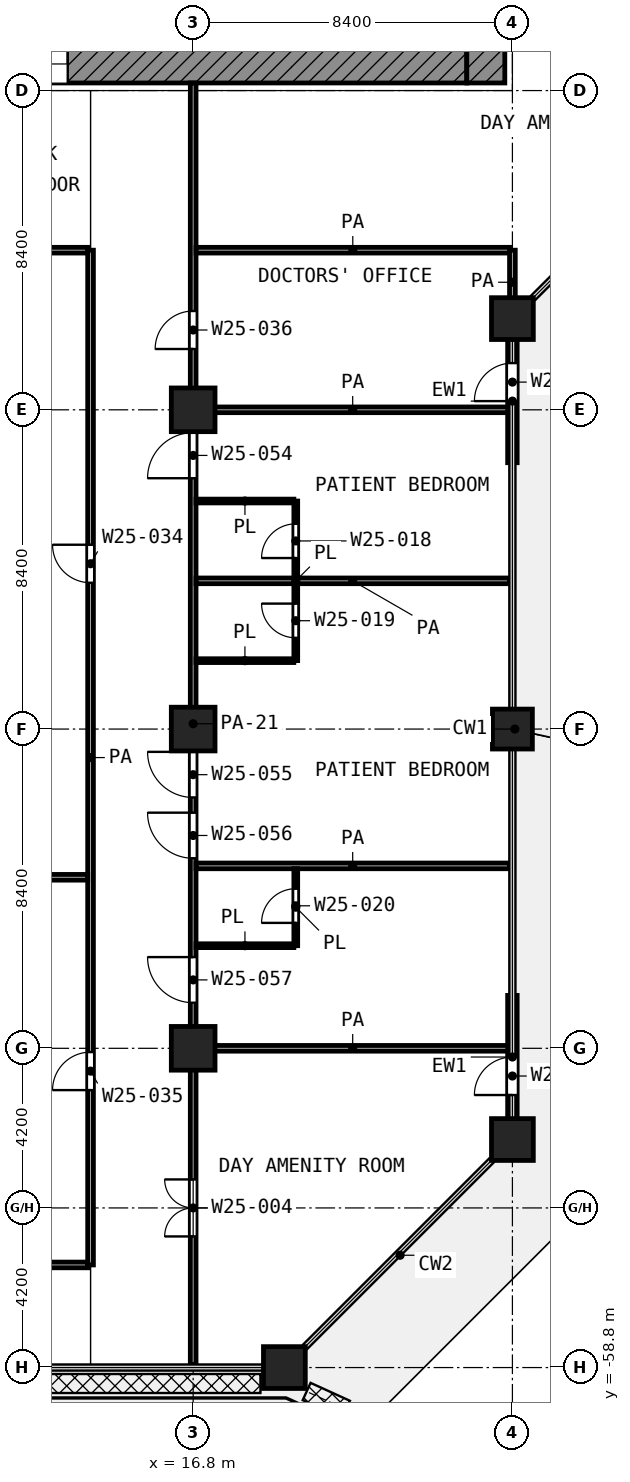
"""IFC4 building model, lengths in metres.
Left out: names, types, materials, properties, quantities, classifications, styles, units other than length and angle.
Written with IfcOpenShell. Run it as: python <this file> out.ifc"""

import sys

from ifc_helpers import new_model, si_unit, direction, frame, frame_2d, origin, origin_2d, place, context, subcontext, project, spatial, rectangle, extrude, element, fill, save


model = new_model("IFC4")
c1 = context("Model", 3, precision=1e-05, world=origin(), true_north=direction((0.0, 1.0)))
c2 = subcontext(c1, "Body", "Model", "MODEL_VIEW")
j1 = project(units=[si_unit("LENGTHUNIT", "METRE"), si_unit("PLANEANGLEUNIT", "RADIAN")], contexts=[c1])
p1 = place(None, origin())
s1 = spatial("IfcSite", under=j1, at=p1, CompositionType="ELEMENT")
p2 = place(p1, origin())
s2 = spatial("IfcBuilding", under=s1, at=p2, CompositionType="ELEMENT")
p3 = place(p2, frame((0.0, 0.0, 132.4)))
s3 = spatial("IfcBuildingStorey", under=s2, at=p3, CompositionType="ELEMENT", Elevation=132.4)
p4 = place(p3, frame((25.2, -31.2, 0.0), z_axis=(0.0, 0.0, 1.0), x_axis=(1.0, 0.0, 0.0)))
e1 = element("IfcColumn", 1, at=p4, inside=s3, PredefinedType="COLUMN", context=c2, shape_type="SweptSolid", body=[
    extrude(rectangle(XDim=1.1, YDim=1.1, at=origin_2d()), origin(), (0.0, 0.0, 1.0), 4.2),
])
for number, where, z_axis, x_axis in (
    (2, (16.8, -33.6, 0.0), (0.0, 0.0, 1.0), (1.0, 0.0, 0.0)),
    (3, (16.8, -42.0, 0.0), (0.0, 0.0, 1.0), (1.0, 0.0, 0.0)),
):
    element("IfcColumn", number, at=place(p3, frame(where, z_axis=z_axis, x_axis=x_axis)), inside=s3, PredefinedType="COLUMN", context=c2, shape_type="SweptSolid", body=[
        extrude(rectangle(XDim=1.15, YDim=1.15, at=origin_2d()), origin(), (0.0, 0.0, 1.0), 4.2),
    ])
p5 = place(p3, frame((25.2, -42.0, 0.0), z_axis=(0.0, 0.0, 1.0), x_axis=(1.0, 0.0, 0.0)))
e4 = element("IfcColumn", 4, at=p5, inside=s3, PredefinedType="COLUMN", context=c2, shape_type="SweptSolid", body=[
    extrude(rectangle(XDim=1.05, YDim=1.05, at=origin_2d()), origin(), (0.0, 0.0, 1.0), 4.2),
])
p6 = place(p3, frame((16.8, -50.4, 0.0), z_axis=(0.0, 0.0, 1.0), x_axis=(1.0, 0.0, 0.0)))
e5 = element("IfcColumn", 5, at=p6, inside=s3, PredefinedType="COLUMN", context=c2, shape_type="SweptSolid", body=[
    extrude(rectangle(XDim=1.15, YDim=1.15, at=origin_2d()), origin(), (0.0, 0.0, 1.0), 4.2),
])
for number, where, z_axis, x_axis in (
    (6, (25.2, -52.8, 0.0), (0.0, 0.0, 1.0), (1.0, 0.0, 0.0)),
    (7, (19.2, -58.8, 0.0), (0.0, 0.0, 1.0), (1.0, 0.0, 0.0)),
):
    element("IfcColumn", number, at=place(p3, frame(where, z_axis=z_axis, x_axis=x_axis)), inside=s3, PredefinedType="COLUMN", context=c2, shape_type="SweptSolid", body=[
        extrude(rectangle(XDim=1.1, YDim=1.1, at=origin_2d()), origin(), (0.0, 0.0, 1.0), 4.2),
    ])
p7 = place(p3, frame((25.2, -52.25, 0.0), z_axis=(0.0, 0.0, 1.0), x_axis=(0.0, 1.0, 0.0)))
e8 = element("IfcWall", 8, at=p7, inside=s3, PredefinedType="SOLIDWALL", context=c2, shape_type="SweptSolid", body=[
    extrude(rectangle(XDim=3.242, YDim=0.25, at=frame_2d((1.621, 0.0))), origin(), (0.0, 0.0, 1.0), 3.48),
])
p8 = place(p7, frame((0.621, 0.0, 0.0)))
e9 = element("IfcOpeningElement", 9, at=p8, cuts=e8, PredefinedType="OPENING", context=c2, shape_type="SweptSolid", body=[
    extrude(rectangle(XDim=1.0, YDim=2.1, at=frame_2d((0.5, 1.05))), frame((0.0, 0.135, 0.0), z_axis=(0.0, -1.0, 0.0), x_axis=(1.0, 0.0, 0.0)), (0.0, 0.0, 1.0), 0.27),
])
p9 = place(p3, frame((25.2, -34.992, 0.0), z_axis=(0.0, 0.0, 1.0), x_axis=(0.0, 1.0, 0.0)))
e10 = element("IfcWall", 10, at=p9, inside=s3, PredefinedType="SOLIDWALL", context=c2, shape_type="SweptSolid", body=[
    extrude(rectangle(XDim=3.242, YDim=0.25, at=frame_2d((1.621, 0.0))), origin(), (0.0, 0.0, 1.0), 3.48),
])
p10 = place(p9, frame((1.621, 0.0, 0.0)))
e11 = element("IfcOpeningElement", 11, at=p10, cuts=e10, PredefinedType="OPENING", context=c2, shape_type="SweptSolid", body=[
    extrude(rectangle(XDim=1.0, YDim=2.1, at=frame_2d((0.5, 1.05))), frame((0.0, 0.135, 0.0), z_axis=(0.0, -1.0, 0.0), x_axis=(1.0, 0.0, 0.0)), (0.0, 0.0, 1.0), 0.27),
])
p11 = place(p3, frame((5.4, -24.5, 0.0), z_axis=(0.0, 0.0, 1.0), x_axis=(1.0, 0.0, 0.0)))
e12 = element("IfcWall", 12, at=p11, inside=s3, PredefinedType="SHEAR", context=c2, shape_type="SweptSolid", body=[
    extrude(rectangle(XDim=18.6, YDim=1.0, at=frame_2d((9.3, 0.0))), origin(), (0.0, 0.0, 1.0), 3.6),
])
p12 = place(p11, frame((6.3, 0.0, 0.0)))
e13 = element("IfcOpeningElement", 13, at=p12, cuts=e12, PredefinedType="OPENING", context=c2, shape_type="SweptSolid", body=[
    extrude(rectangle(XDim=1.8, YDim=2.1, at=frame_2d((0.9, 1.05))), frame((0.0, 0.51, 0.0), z_axis=(0.0, -1.0, 0.0), x_axis=(1.0, 0.0, 0.0)), (0.0, 0.0, 1.0), 1.02),
])
p13 = place(p3, frame((24.5, -25.0, 0.0), z_axis=(0.0, 0.0, 1.0), x_axis=(0.0, 1.0, 0.0)))
e14 = element("IfcWall", 14, at=p13, inside=s3, PredefinedType="SHEAR", context=c2, shape_type="SweptSolid", body=[
    extrude(rectangle(XDim=1.0, YDim=1.0, at=frame_2d((0.5, 0.0))), origin(), (0.0, 0.0, 1.0), 3.6),
])
p14 = place(p3, frame((16.875, -47.7, 0.0), z_axis=(0.0, 0.0, 1.0), x_axis=(1.0, 0.0, 0.0)))
e15 = element("IfcWall", 15, at=p14, inside=s3, PredefinedType="PARTITIONING", context=c2, shape_type="SweptSolid", body=[
    extrude(rectangle(XDim=2.575, YDim=0.1, at=frame_2d((1.288, 0.0))), origin(), (0.0, 0.0, 1.0), 3.6),
])
p15 = place(p3, frame((16.875, -40.2, 0.0), z_axis=(0.0, 0.0, 1.0), x_axis=(1.0, 0.0, 0.0)))
e16 = element("IfcWall", 16, at=p15, inside=s3, PredefinedType="PARTITIONING", context=c2, shape_type="SweptSolid", body=[
    extrude(rectangle(XDim=2.574, YDim=0.1, at=frame_2d((1.287, 0.0))), origin(), (0.0, 0.0, 1.0), 3.6),
])
p16 = place(p3, frame((16.875, -36.0, 0.0), z_axis=(0.0, 0.0, 1.0), x_axis=(1.0, 0.0, 0.0)))
e17 = element("IfcWall", 17, at=p16, inside=s3, PredefinedType="PARTITIONING", context=c2, shape_type="SweptSolid", body=[
    extrude(rectangle(XDim=2.575, YDim=0.1, at=frame_2d((1.288, 0.0))), origin(), (0.0, 0.0, 1.0), 3.6),
])
p17 = place(p3, frame((19.5, -47.7, 0.0), z_axis=(0.0, 0.0, 1.0), x_axis=(0.0, 1.0, 0.0)))
e18 = element("IfcWall", 18, at=p17, inside=s3, PredefinedType="PARTITIONING", context=c2, shape_type="SweptSolid", body=[
    extrude(rectangle(XDim=2.025, YDim=0.1, at=frame_2d((1.012, 0.0))), origin(), (0.0, 0.0, 1.0), 3.6),
])
p18 = place(p17, frame((0.6, 0.0, 0.0)))
e19 = element("IfcOpeningElement", 19, at=p18, cuts=e18, PredefinedType="OPENING", context=c2, shape_type="SweptSolid", body=[
    extrude(rectangle(XDim=0.9, YDim=2.1, at=frame_2d((0.45, 1.05))), frame((0.0, 0.06, 0.0), z_axis=(0.0, -1.0, 0.0), x_axis=(1.0, 0.0, 0.0)), (0.0, 0.0, 1.0), 0.12),
])
p19 = place(p3, frame((19.5, -40.198, 0.0), z_axis=(0.0, 0.0, 1.0), x_axis=(0.0, 1.0, 0.0)))
e20 = element("IfcWall", 20, at=p19, inside=s3, PredefinedType="PARTITIONING", context=c2, shape_type="SweptSolid", body=[
    extrude(rectangle(XDim=4.198, YDim=0.1, at=frame_2d((2.099, 0.0))), origin(), (0.0, 0.0, 1.0), 3.6),
])
p20 = place(p19, frame((2.698, 0.0, 0.0)))
e21 = element("IfcOpeningElement", 21, at=p20, cuts=e20, PredefinedType="OPENING", context=c2, shape_type="SweptSolid", body=[
    extrude(rectangle(XDim=0.9, YDim=2.1, at=frame_2d((0.45, 1.05))), frame((0.0, 0.06, 0.0), z_axis=(0.0, -1.0, 0.0), x_axis=(1.0, 0.0, 0.0)), (0.0, 0.0, 1.0), 0.12),
])
p21 = place(p19, frame((0.599, 0.0, 0.0)))
e22 = element("IfcOpeningElement", 22, at=p21, cuts=e20, PredefinedType="OPENING", context=c2, shape_type="SweptSolid", body=[
    extrude(rectangle(XDim=0.9, YDim=2.1, at=frame_2d((0.45, 1.05))), frame((0.0, 0.06, 0.0), z_axis=(0.0, -1.0, 0.0), x_axis=(1.0, 0.0, 0.0)), (0.0, 0.0, 1.0), 0.12),
])
p22 = place(p3, frame((11.175, -56.1, 0.0), z_axis=(0.0, 0.0, 1.0), x_axis=(1.0, 0.0, 0.0)))
e23 = element("IfcWall", 23, at=p22, inside=s3, PredefinedType="PARTITIONING", context=c2, shape_type="SweptSolid", body=[
    extrude(rectangle(XDim=2.85, YDim=0.15, at=frame_2d((1.425, 0.0))), origin(), (0.0, 0.0, 1.0), 3.6),
])
p23 = place(p3, frame((16.875, -50.4, 0.0), z_axis=(0.0, 0.0, 1.0), x_axis=(1.0, 0.0, 0.0)))
e24 = element("IfcWall", 24, at=p23, inside=s3, PredefinedType="PARTITIONING", context=c2, shape_type="SweptSolid", body=[
    extrude(rectangle(XDim=8.245, YDim=0.15, at=frame_2d((4.123, 0.0))), origin(), (0.0, 0.0, 1.0), 3.6),
])
p24 = place(p3, frame((11.175, -45.9, 0.0), z_axis=(0.0, 0.0, 1.0), x_axis=(1.0, 0.0, 0.0)))
e25 = element("IfcWall", 25, at=p24, inside=s3, PredefinedType="PARTITIONING", context=c2, shape_type="SweptSolid", body=[
    extrude(rectangle(XDim=2.85, YDim=0.15, at=frame_2d((1.425, 0.0))), origin(), (0.0, 0.0, 1.0), 3.6),
])
for number, where, z_axis, x_axis in (
    (26, (16.875, -45.6, 0.0), (0.0, 0.0, 1.0), (1.0, 0.0, 0.0)),
    (27, (16.875, -38.1, 0.0), (0.0, 0.0, 1.0), (1.0, 0.0, 0.0)),
    (28, (16.875, -33.6, 0.0), (0.0, 0.0, 1.0), (1.0, 0.0, 0.0)),
):
    element("IfcWall", number, at=place(p3, frame(where, z_axis=z_axis, x_axis=x_axis)), inside=s3, PredefinedType="PARTITIONING", context=c2, shape_type="SweptSolid", body=[
        extrude(rectangle(XDim=8.245, YDim=0.15, at=frame_2d((4.123, 0.0))), origin(), (0.0, 0.0, 1.0), 3.6),
    ])
p25 = place(p3, frame((11.175, -29.4, 0.0), z_axis=(0.0, 0.0, 1.0), x_axis=(1.0, 0.0, 0.0)))
e29 = element("IfcWall", 29, at=p25, inside=s3, PredefinedType="PARTITIONING", context=c2, shape_type="SweptSolid", body=[
    extrude(rectangle(XDim=2.85, YDim=0.15, at=frame_2d((1.425, 0.0))), origin(), (0.0, 0.0, 1.0), 3.6),
])
p26 = place(p3, frame((16.875, -29.4, 0.0), z_axis=(0.0, 0.0, 1.0), x_axis=(1.0, 0.0, 0.0)))
e30 = element("IfcWall", 30, at=p26, inside=s3, PredefinedType="PARTITIONING", context=c2, shape_type="SweptSolid", body=[
    extrude(rectangle(XDim=8.25, YDim=0.15, at=frame_2d((4.125, 0.0))), origin(), (0.0, 0.0, 1.0), 3.6),
])
p27 = place(p3, frame((14.1, -56.1, 0.0), z_axis=(0.0, 0.0, 1.0), x_axis=(0.0, 1.0, 0.0)))
e31 = element("IfcWall", 31, at=p27, inside=s3, PredefinedType="PARTITIONING", context=c2, shape_type="SweptSolid", body=[
    extrude(rectangle(XDim=26.7, YDim=0.15, at=frame_2d((13.35, 0.0))), origin(), (0.0, 0.0, 1.0), 3.6),
])
p28 = place(p27, frame((17.95, 0.0, 0.0)))
e32 = element("IfcOpeningElement", 32, at=p28, cuts=e31, PredefinedType="OPENING", context=c2, shape_type="SweptSolid", body=[
    extrude(rectangle(XDim=1.0, YDim=2.1, at=frame_2d((0.5, 1.05))), frame((0.0, 0.085, 0.0), z_axis=(0.0, -1.0, 0.0), x_axis=(1.0, 0.0, 0.0)), (0.0, 0.0, 1.0), 0.17),
])
p29 = place(p27, frame((4.6, 0.0, 0.0)))
e33 = element("IfcOpeningElement", 33, at=p29, cuts=e31, PredefinedType="OPENING", context=c2, shape_type="SweptSolid", body=[
    extrude(rectangle(XDim=1.0, YDim=2.1, at=frame_2d((0.5, 1.05))), frame((0.0, 0.085, 0.0), z_axis=(0.0, -1.0, 0.0), x_axis=(1.0, 0.0, 0.0)), (0.0, 0.0, 1.0), 0.17),
])
p30 = place(p3, frame((16.8, -58.72, 0.0), z_axis=(0.0, 0.0, 1.0), x_axis=(0.0, 1.0, 0.0)))
e34 = element("IfcWall", 34, at=p30, inside=s3, PredefinedType="PARTITIONING", context=c2, shape_type="SweptSolid", body=[
    extrude(rectangle(XDim=33.72, YDim=0.15, at=frame_2d((16.86, 0.0))), origin(), (0.0, 0.0, 1.0), 2.7),
])
p31 = place(p30, frame((26.72, 0.0, 0.0)))
e35 = element("IfcOpeningElement", 35, at=p31, cuts=e34, PredefinedType="OPENING", context=c2, shape_type="SweptSolid", body=[
    extrude(rectangle(XDim=1.0, YDim=2.1, at=frame_2d((0.5, 1.05))), frame((0.0, 0.085, 0.0), z_axis=(0.0, -1.0, 0.0), x_axis=(1.0, 0.0, 0.0)), (0.0, 0.0, 1.0), 0.17),
])
p32 = place(p30, frame((23.32, 0.0, 0.0)))
e36 = element("IfcOpeningElement", 36, at=p32, cuts=e34, PredefinedType="OPENING", context=c2, shape_type="SweptSolid", body=[
    extrude(rectangle(XDim=1.2, YDim=2.1, at=frame_2d((0.6, 1.05))), frame((0.0, 0.085, 0.0), z_axis=(0.0, -1.0, 0.0), x_axis=(1.0, 0.0, 0.0)), (0.0, 0.0, 1.0), 0.17),
])
p33 = place(p30, frame((14.92, 0.0, 0.0)))
e37 = element("IfcOpeningElement", 37, at=p33, cuts=e34, PredefinedType="OPENING", context=c2, shape_type="SweptSolid", body=[
    extrude(rectangle(XDim=1.2, YDim=2.1, at=frame_2d((0.6, 1.05))), frame((0.0, 0.085, 0.0), z_axis=(0.0, -1.0, 0.0), x_axis=(1.0, 0.0, 0.0)), (0.0, 0.0, 1.0), 0.17),
])
p34 = place(p30, frame((13.32, 0.0, 0.0)))
e38 = element("IfcOpeningElement", 38, at=p34, cuts=e34, PredefinedType="OPENING", context=c2, shape_type="SweptSolid", body=[
    extrude(rectangle(XDim=1.2, YDim=2.1, at=frame_2d((0.6, 1.05))), frame((0.0, 0.085, 0.0), z_axis=(0.0, -1.0, 0.0), x_axis=(1.0, 0.0, 0.0)), (0.0, 0.0, 1.0), 0.17),
])
p35 = place(p30, frame((9.52, 0.0, 0.0)))
e39 = element("IfcOpeningElement", 39, at=p35, cuts=e34, PredefinedType="OPENING", context=c2, shape_type="SweptSolid", body=[
    extrude(rectangle(XDim=1.2, YDim=2.1, at=frame_2d((0.6, 1.05))), frame((0.0, 0.085, 0.0), z_axis=(0.0, -1.0, 0.0), x_axis=(1.0, 0.0, 0.0)), (0.0, 0.0, 1.0), 0.17),
])
p36 = place(p30, frame((3.37, 0.0, 0.0)))
e40 = element("IfcOpeningElement", 40, at=p36, cuts=e34, PredefinedType="OPENING", context=c2, shape_type="SweptSolid", body=[
    extrude(rectangle(XDim=1.5, YDim=2.1, at=frame_2d((0.75, 1.05))), frame((0.0, 0.085, 0.0), z_axis=(0.0, -1.0, 0.0), x_axis=(1.0, 0.0, 0.0)), (0.0, 0.0, 1.0), 0.17),
])
p37 = place(p3, frame((25.2, -31.087, 0.0), z_axis=(0.0, 0.0, 1.0), x_axis=(0.0, 1.0, 0.0)))
e41 = element("IfcWall", 41, at=p37, inside=s3, PredefinedType="PARTITIONING", context=c2, shape_type="SweptSolid", body=[
    extrude(rectangle(XDim=1.687, YDim=0.15, at=frame_2d((0.844, 0.0))), origin(), (0.0, 0.0, 1.0), 3.6),
])
p38 = place(p8, origin())
e42 = element("IfcDoor", 42, at=p38, inside=s3, OperationType="SINGLE_SWING_LEFT", PredefinedType="DOOR", context=c2, shape_type="SweptSolid", body=[
    extrude(rectangle(XDim=1.0, YDim=2.1, at=frame_2d((0.5, 1.05))), frame((0.0, 0.025, 0.0), z_axis=(0.0, -1.0, 0.0), x_axis=(1.0, 0.0, 0.0)), (0.0, 0.0, 1.0), 0.05),
])
fill(e9, e42)
p39 = place(p10, origin())
e43 = element("IfcDoor", 43, at=p39, inside=s3, OperationType="SINGLE_SWING_LEFT", PredefinedType="DOOR", context=c2, shape_type="SweptSolid", body=[
    extrude(rectangle(XDim=1.0, YDim=2.1, at=frame_2d((0.5, 1.05))), frame((0.0, 0.025, 0.0), z_axis=(0.0, -1.0, 0.0), x_axis=(1.0, 0.0, 0.0)), (0.0, 0.0, 1.0), 0.05),
])
fill(e11, e43)
p40 = place(p12, origin())
e44 = element("IfcDoor", 44, at=p40, inside=s3, OperationType="DOUBLE_DOOR_SINGLE_SWING", PredefinedType="DOOR", context=c2, shape_type="SweptSolid", body=[
    extrude(rectangle(XDim=1.8, YDim=2.1, at=frame_2d((0.9, 1.05))), frame((0.0, 0.025, 0.0), z_axis=(0.0, -1.0, 0.0), x_axis=(1.0, 0.0, 0.0)), (0.0, 0.0, 1.0), 0.05),
])
fill(e13, e44)
p41 = place(p28, origin())
e45 = element("IfcDoor", 45, at=p41, inside=s3, OperationType="SINGLE_SWING_RIGHT", PredefinedType="DOOR", context=c2, shape_type="SweptSolid", body=[
    extrude(rectangle(XDim=1.0, YDim=2.1, at=frame_2d((0.5, 1.05))), frame((0.0, 0.025, 0.0), z_axis=(0.0, -1.0, 0.0), x_axis=(1.0, 0.0, 0.0)), (0.0, 0.0, 1.0), 0.05),
])
fill(e32, e45)
p42 = place(p29, origin())
e46 = element("IfcDoor", 46, at=p42, inside=s3, OperationType="SINGLE_SWING_LEFT", PredefinedType="DOOR", context=c2, shape_type="SweptSolid", body=[
    extrude(rectangle(XDim=1.0, YDim=2.1, at=frame_2d((0.5, 1.05))), frame((0.0, 0.025, 0.0), z_axis=(0.0, -1.0, 0.0), x_axis=(1.0, 0.0, 0.0)), (0.0, 0.0, 1.0), 0.05),
])
fill(e33, e46)
p43 = place(p31, origin())
e47 = element("IfcDoor", 47, at=p43, inside=s3, OperationType="SINGLE_SWING_LEFT", PredefinedType="DOOR", context=c2, shape_type="SweptSolid", body=[
    extrude(rectangle(XDim=1.0, YDim=2.1, at=frame_2d((0.5, 1.05))), frame((0.0, 0.025, 0.0), z_axis=(0.0, -1.0, 0.0), x_axis=(1.0, 0.0, 0.0)), (0.0, 0.0, 1.0), 0.05),
])
fill(e35, e47)
p44 = place(p32, origin())
e48 = element("IfcDoor", 48, at=p44, inside=s3, OperationType="SINGLE_SWING_LEFT", PredefinedType="DOOR", context=c2, shape_type="SweptSolid", body=[
    extrude(rectangle(XDim=1.2, YDim=2.1, at=frame_2d((0.6, 1.05))), frame((0.0, 0.025, 0.0), z_axis=(0.0, -1.0, 0.0), x_axis=(1.0, 0.0, 0.0)), (0.0, 0.0, 1.0), 0.05),
])
fill(e36, e48)
p45 = place(p20, origin())
e49 = element("IfcDoor", 49, at=p45, inside=s3, OperationType="SINGLE_SWING_LEFT", PredefinedType="DOOR", context=c2, shape_type="SweptSolid", body=[
    extrude(rectangle(XDim=0.9, YDim=2.1, at=frame_2d((0.45, 1.05))), frame((0.0, 0.025, 0.0), z_axis=(0.0, -1.0, 0.0), x_axis=(1.0, 0.0, 0.0)), (0.0, 0.0, 1.0), 0.05),
])
fill(e21, e49)
p46 = place(p33, origin())
e50 = element("IfcDoor", 50, at=p46, inside=s3, OperationType="SINGLE_SWING_RIGHT", PredefinedType="DOOR", context=c2, shape_type="SweptSolid", body=[
    extrude(rectangle(XDim=1.2, YDim=2.1, at=frame_2d((0.6, 1.05))), frame((0.0, 0.025, 0.0), z_axis=(0.0, -1.0, 0.0), x_axis=(1.0, 0.0, 0.0)), (0.0, 0.0, 1.0), 0.05),
])
fill(e37, e50)
p47 = place(p34, origin())
e51 = element("IfcDoor", 51, at=p47, inside=s3, OperationType="SINGLE_SWING_RIGHT", PredefinedType="DOOR", context=c2, shape_type="SweptSolid", body=[
    extrude(rectangle(XDim=1.2, YDim=2.1, at=frame_2d((0.6, 1.05))), frame((0.0, 0.025, 0.0), z_axis=(0.0, -1.0, 0.0), x_axis=(1.0, 0.0, 0.0)), (0.0, 0.0, 1.0), 0.05),
])
fill(e38, e51)
p48 = place(p21, origin())
e52 = element("IfcDoor", 52, at=p48, inside=s3, OperationType="SINGLE_SWING_RIGHT", PredefinedType="DOOR", context=c2, shape_type="SweptSolid", body=[
    extrude(rectangle(XDim=0.9, YDim=2.1, at=frame_2d((0.45, 1.05))), frame((0.0, 0.025, 0.0), z_axis=(0.0, -1.0, 0.0), x_axis=(1.0, 0.0, 0.0)), (0.0, 0.0, 1.0), 0.05),
])
fill(e22, e52)
p49 = place(p35, origin())
e53 = element("IfcDoor", 53, at=p49, inside=s3, OperationType="SINGLE_SWING_RIGHT", PredefinedType="DOOR", context=c2, shape_type="SweptSolid", body=[
    extrude(rectangle(XDim=1.2, YDim=2.1, at=frame_2d((0.6, 1.05))), frame((0.0, 0.025, 0.0), z_axis=(0.0, -1.0, 0.0), x_axis=(1.0, 0.0, 0.0)), (0.0, 0.0, 1.0), 0.05),
])
fill(e39, e53)
p50 = place(p18, origin())
e54 = element("IfcDoor", 54, at=p50, inside=s3, OperationType="SINGLE_SWING_LEFT", PredefinedType="DOOR", context=c2, shape_type="SweptSolid", body=[
    extrude(rectangle(XDim=0.9, YDim=2.1, at=frame_2d((0.45, 1.05))), frame((0.0, 0.025, 0.0), z_axis=(0.0, -1.0, 0.0), x_axis=(1.0, 0.0, 0.0)), (0.0, 0.0, 1.0), 0.05),
])
fill(e19, e54)
p51 = place(p36, origin())
e55 = element("IfcDoor", 55, at=p51, inside=s3, OperationType="DOUBLE_DOOR_SINGLE_SWING", PredefinedType="DOOR", context=c2, shape_type="SweptSolid", body=[
    extrude(rectangle(XDim=1.5, YDim=2.1, at=frame_2d((0.75, 1.05))), frame((0.0, 0.025, 0.0), z_axis=(0.0, -1.0, 0.0), x_axis=(1.0, 0.0, 0.0)), (0.0, 0.0, 1.0), 0.05),
])
fill(e40, e55)
save(model, sys.argv[1])
